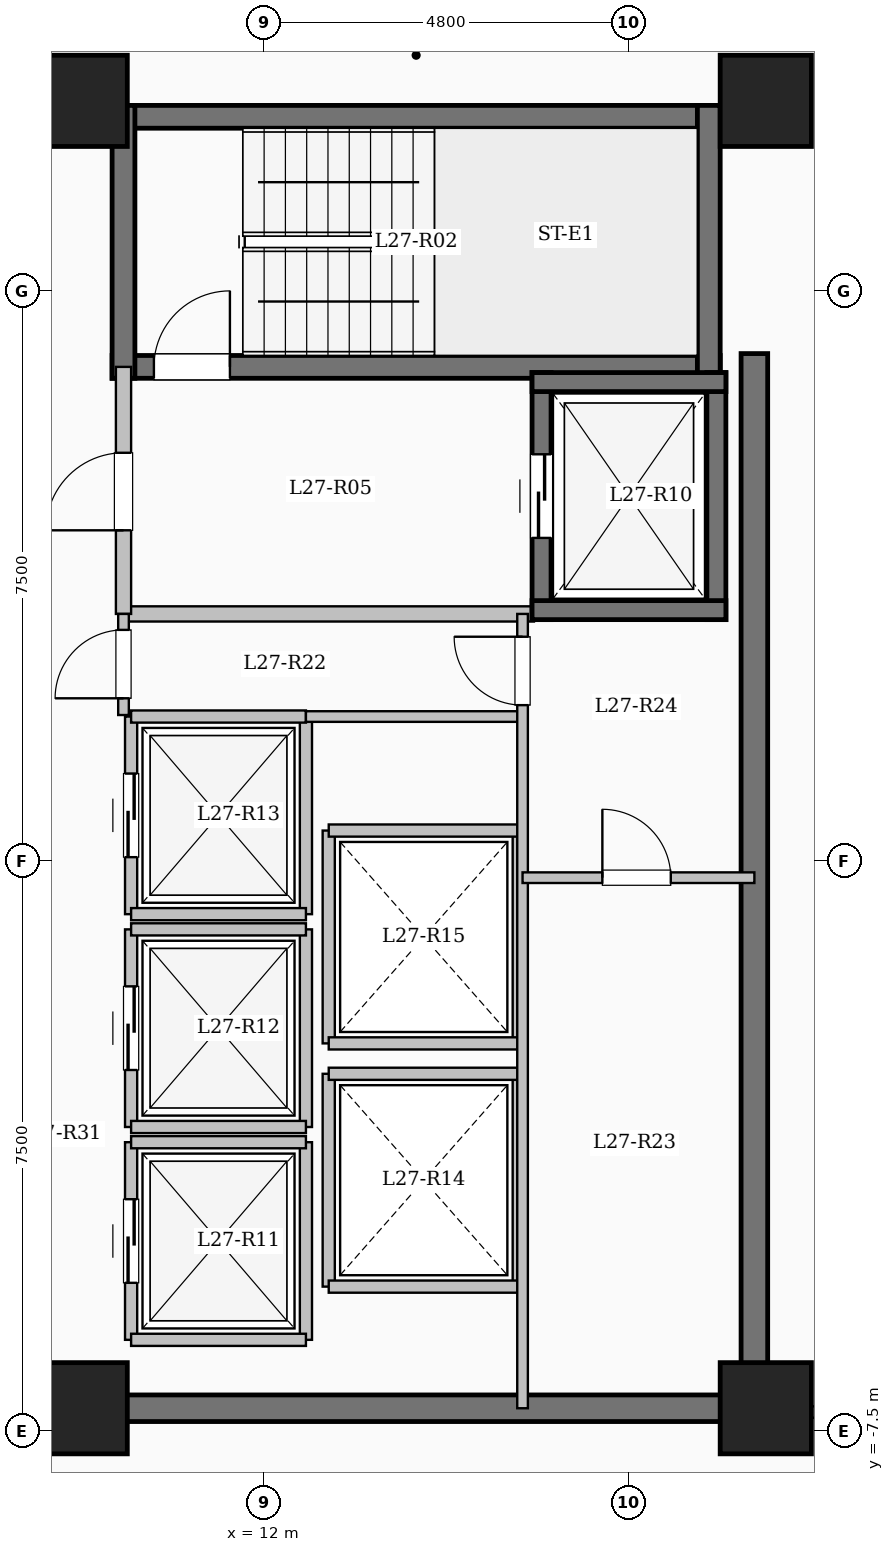
"""IFC4 building model, lengths in metres.
Left out: names, types, materials, properties, quantities, classifications, styles, units other than length and angle.
Written with IfcOpenShell. Run it as: python <this file> out.ifc"""

import sys

from ifc_helpers import new_model, si_unit, direction, frame, frame_2d, origin, origin_2d, place, context, subcontext, project, spatial, rectangle, extrude, element, fill, save


model = new_model("IFC4")
c1 = context("Model", 3, precision=1e-05, world=origin(), true_north=direction((0.0, 1.0)))
c2 = subcontext(c1, "Body", "Model", "MODEL_VIEW")
j1 = project(units=[si_unit("LENGTHUNIT", "METRE"), si_unit("PLANEANGLEUNIT", "RADIAN")], contexts=[c1])
p1 = place(None, origin())
s1 = spatial("IfcSite", under=j1, at=p1, CompositionType="ELEMENT")
p2 = place(p1, origin())
s2 = spatial("IfcBuilding", under=s1, at=p2, CompositionType="ELEMENT")
p3 = place(p2, frame((0.0, 0.0, 101.75)))
s3 = spatial("IfcBuildingStorey", under=s2, at=p3, CompositionType="ELEMENT", Elevation=101.75)
for number, where, z_axis, x_axis in (
    (1, (9.6, -7.2, 0.0), (0.0, 0.0, 1.0), (1.0, 0.0, 0.0)),
    (2, (9.6, 10.0, 0.0), (0.0, 0.0, 1.0), (1.0, 0.0, 0.0)),
    (3, (18.6, -7.2, 0.0), (0.0, 0.0, 1.0), (1.0, 0.0, 0.0)),
    (4, (18.6, 10.0, 0.0), (0.0, 0.0, 1.0), (1.0, 0.0, 0.0)),
):
    element("IfcColumn", number, at=place(p3, frame(where, z_axis=z_axis, x_axis=x_axis)), inside=s3, PredefinedType="COLUMN", context=c2, shape_type="SweptSolid", body=[
        extrude(rectangle(XDim=1.2, YDim=1.2, at=origin_2d()), origin(), (0.0, 0.0, 1.0), 3.35),
    ])
p4 = place(p3, frame((10.0, 9.79, 0.0), z_axis=(0.0, 0.0, 1.0), x_axis=(1.0, 0.0, 0.0)))
e5 = element("IfcWall", 5, at=p4, inside=s3, PredefinedType="SHEAR", context=c2, shape_type="SweptSolid", body=[
    extrude(rectangle(XDim=8.0, YDim=0.3, at=frame_2d((4.0, 0.0))), origin(), (0.0, 0.0, 1.0), 3.35),
])
p5 = place(p3, frame((10.0, 6.5, 0.0), z_axis=(0.0, 0.0, 1.0), x_axis=(1.0, 0.0, 0.0)))
e6 = element("IfcWall", 6, at=p5, inside=s3, PredefinedType="SHEAR", context=c2, shape_type="SweptSolid", body=[
    extrude(rectangle(XDim=8.0, YDim=0.3, at=frame_2d((4.0, 0.0))), origin(), (0.0, 0.0, 1.0), 3.35),
])
p6 = place(p5, frame((0.55, 0.0, 0.0)))
e7 = element("IfcOpeningElement", 7, at=p6, cuts=e6, PredefinedType="OPENING", context=c2, shape_type="SweptSolid", body=[
    extrude(rectangle(XDim=1.0, YDim=2.15, at=frame_2d((0.5, 1.075))), frame((0.0, 0.16, 0.0), z_axis=(0.0, -1.0, 0.0), x_axis=(1.0, 0.0, 0.0)), (0.0, 0.0, 1.0), 0.32),
])
for number, where, z_axis, x_axis in (
    (8, (10.15, 6.35, 0.0), (0.0, 0.0, 1.0), (0.0, 1.0, 0.0)),
    (9, (17.85, 6.35, 0.0), (0.0, 0.0, 1.0), (0.0, 1.0, 0.0)),
):
    element("IfcWall", number, at=place(p3, frame(where, z_axis=z_axis, x_axis=x_axis)), inside=s3, PredefinedType="SHEAR", context=c2, shape_type="SweptSolid", body=[
        extrude(rectangle(XDim=3.59, YDim=0.3, at=frame_2d((1.795, 0.0))), origin(), (0.0, 0.0, 1.0), 3.35),
    ])
p7 = place(p3, frame((10.15, 3.25, 0.0), z_axis=(0.0, 0.0, 1.0), x_axis=(1.0, 0.0, 0.0)))
e10 = element("IfcWall", 10, at=p7, inside=s3, PredefinedType="SOLIDWALL", context=c2, shape_type="SweptSolid", body=[
    extrude(rectangle(XDim=5.4, YDim=0.2, at=frame_2d((2.7, 0.0))), origin(), (0.0, 0.0, 1.0), 3.1),
])
p8 = place(p3, frame((10.15, 3.25, 0.0), z_axis=(0.0, 0.0, 1.0), x_axis=(0.0, 1.0, 0.0)))
e11 = element("IfcWall", 11, at=p8, inside=s3, PredefinedType="SOLIDWALL", context=c2, shape_type="SweptSolid", body=[
    extrude(rectangle(XDim=3.25, YDim=0.2, at=frame_2d((1.625, 0.0))), origin(), (0.0, 0.0, 1.0), 3.1),
])
p9 = place(p8, frame((1.1, 0.0, 0.0)))
e12 = element("IfcOpeningElement", 12, at=p9, cuts=e11, PredefinedType="OPENING", context=c2, shape_type="SweptSolid", body=[
    extrude(rectangle(XDim=1.02, YDim=2.15, at=frame_2d((0.51, 1.075))), frame((0.0, 0.11, 0.0), z_axis=(0.0, -1.0, 0.0), x_axis=(1.0, 0.0, 0.0)), (0.0, 0.0, 1.0), 0.22),
])
p10 = place(p3, frame((15.65, 3.175, 0.0), z_axis=(0.0, 0.0, 1.0), x_axis=(0.0, 1.0, 0.0)))
e13 = element("IfcWall", 13, at=p10, inside=s3, PredefinedType="SHEAR", context=c2, shape_type="SweptSolid", body=[
    extrude(rectangle(XDim=3.25, YDim=0.25, at=frame_2d((1.625, 0.0))), origin(), (0.0, 0.0, 1.0), 3.35),
])
p11 = place(p10, frame((1.075, 0.0, 0.0)))
e14 = element("IfcOpeningElement", 14, at=p11, cuts=e13, PredefinedType="OPENING", context=c2, shape_type="SweptSolid", body=[
    extrude(rectangle(XDim=1.1, YDim=2.15, at=frame_2d((0.55, 1.075))), frame((0.0, 0.135, 0.0), z_axis=(0.0, -1.0, 0.0), x_axis=(1.0, 0.0, 0.0)), (0.0, 0.0, 1.0), 0.27),
])
p12 = place(p3, frame((17.95, 3.175, 0.0), z_axis=(0.0, 0.0, 1.0), x_axis=(0.0, 1.0, 0.0)))
e15 = element("IfcWall", 15, at=p12, inside=s3, PredefinedType="SHEAR", context=c2, shape_type="SweptSolid", body=[
    extrude(rectangle(XDim=3.25, YDim=0.25, at=frame_2d((1.625, 0.0))), origin(), (0.0, 0.0, 1.0), 3.35),
])
for number, where, z_axis, x_axis in (
    (16, (15.525, 3.3, 0.0), (0.0, 0.0, 1.0), (1.0, 0.0, 0.0)),
    (17, (15.525, 6.3, 0.0), (0.0, 0.0, 1.0), (1.0, 0.0, 0.0)),
):
    element("IfcWall", number, at=place(p3, frame(where, z_axis=z_axis, x_axis=x_axis)), inside=s3, PredefinedType="SHEAR", context=c2, shape_type="SweptSolid", body=[
        extrude(rectangle(XDim=2.55, YDim=0.25, at=frame_2d((1.275, 0.0))), origin(), (0.0, 0.0, 1.0), 3.35),
    ])
p13 = place(p3, frame((10.25, -6.3, 0.0), z_axis=(0.0, 0.0, 1.0), x_axis=(0.0, 1.0, 0.0)))
e18 = element("IfcWall", 18, at=p13, inside=s3, PredefinedType="SOLIDWALL", context=c2, shape_type="SweptSolid", body=[
    extrude(rectangle(XDim=2.6, YDim=0.16, at=frame_2d((1.3, 0.0))), origin(), (0.0, 0.0, 1.0), 3.1),
])
p14 = place(p13, frame((0.75, 0.0, 0.0)))
e19 = element("IfcOpeningElement", 19, at=p14, cuts=e18, PredefinedType="OPENING", context=c2, shape_type="SweptSolid", body=[
    extrude(rectangle(XDim=1.1, YDim=2.15, at=frame_2d((0.55, 1.075))), frame((0.0, 0.09, 0.0), z_axis=(0.0, -1.0, 0.0), x_axis=(1.0, 0.0, 0.0)), (0.0, 0.0, 1.0), 0.18),
])
p15 = place(p3, frame((12.55, -6.3, 0.0), z_axis=(0.0, 0.0, 1.0), x_axis=(0.0, 1.0, 0.0)))
e20 = element("IfcWall", 20, at=p15, inside=s3, PredefinedType="SOLIDWALL", context=c2, shape_type="SweptSolid", body=[
    extrude(rectangle(XDim=2.6, YDim=0.16, at=frame_2d((1.3, 0.0))), origin(), (0.0, 0.0, 1.0), 3.1),
])
for number, where, z_axis, x_axis in (
    (21, (10.25, -6.3, 0.0), (0.0, 0.0, 1.0), (1.0, 0.0, 0.0)),
    (22, (10.25, -3.7, 0.0), (0.0, 0.0, 1.0), (1.0, 0.0, 0.0)),
):
    element("IfcWall", number, at=place(p3, frame(where, z_axis=z_axis, x_axis=x_axis)), inside=s3, PredefinedType="SOLIDWALL", context=c2, shape_type="SweptSolid", body=[
        extrude(rectangle(XDim=2.3, YDim=0.16, at=frame_2d((1.15, 0.0))), origin(), (0.0, 0.0, 1.0), 3.1),
    ])
p16 = place(p3, frame((10.25, -3.5, 0.0), z_axis=(0.0, 0.0, 1.0), x_axis=(0.0, 1.0, 0.0)))
e23 = element("IfcWall", 23, at=p16, inside=s3, PredefinedType="SOLIDWALL", context=c2, shape_type="SweptSolid", body=[
    extrude(rectangle(XDim=2.6, YDim=0.16, at=frame_2d((1.3, 0.0))), origin(), (0.0, 0.0, 1.0), 3.1),
])
p17 = place(p16, frame((0.75, 0.0, 0.0)))
e24 = element("IfcOpeningElement", 24, at=p17, cuts=e23, PredefinedType="OPENING", context=c2, shape_type="SweptSolid", body=[
    extrude(rectangle(XDim=1.1, YDim=2.15, at=frame_2d((0.55, 1.075))), frame((0.0, 0.09, 0.0), z_axis=(0.0, -1.0, 0.0), x_axis=(1.0, 0.0, 0.0)), (0.0, 0.0, 1.0), 0.18),
])
p18 = place(p3, frame((12.55, -3.5, 0.0), z_axis=(0.0, 0.0, 1.0), x_axis=(0.0, 1.0, 0.0)))
e25 = element("IfcWall", 25, at=p18, inside=s3, PredefinedType="SOLIDWALL", context=c2, shape_type="SweptSolid", body=[
    extrude(rectangle(XDim=2.6, YDim=0.16, at=frame_2d((1.3, 0.0))), origin(), (0.0, 0.0, 1.0), 3.1),
])
for number, where, z_axis, x_axis in (
    (26, (10.25, -3.5, 0.0), (0.0, 0.0, 1.0), (1.0, 0.0, 0.0)),
    (27, (10.25, -0.9, 0.0), (0.0, 0.0, 1.0), (1.0, 0.0, 0.0)),
):
    element("IfcWall", number, at=place(p3, frame(where, z_axis=z_axis, x_axis=x_axis)), inside=s3, PredefinedType="SOLIDWALL", context=c2, shape_type="SweptSolid", body=[
        extrude(rectangle(XDim=2.3, YDim=0.16, at=frame_2d((1.15, 0.0))), origin(), (0.0, 0.0, 1.0), 3.1),
    ])
p19 = place(p3, frame((10.25, -0.7, 0.0), z_axis=(0.0, 0.0, 1.0), x_axis=(0.0, 1.0, 0.0)))
e28 = element("IfcWall", 28, at=p19, inside=s3, PredefinedType="SOLIDWALL", context=c2, shape_type="SweptSolid", body=[
    extrude(rectangle(XDim=2.6, YDim=0.16, at=frame_2d((1.3, 0.0))), origin(), (0.0, 0.0, 1.0), 3.1),
])
p20 = place(p19, frame((0.75, 0.0, 0.0)))
e29 = element("IfcOpeningElement", 29, at=p20, cuts=e28, PredefinedType="OPENING", context=c2, shape_type="SweptSolid", body=[
    extrude(rectangle(XDim=1.1, YDim=2.15, at=frame_2d((0.55, 1.075))), frame((0.0, 0.09, 0.0), z_axis=(0.0, -1.0, 0.0), x_axis=(1.0, 0.0, 0.0)), (0.0, 0.0, 1.0), 0.18),
])
p21 = place(p3, frame((12.55, -0.7, 0.0), z_axis=(0.0, 0.0, 1.0), x_axis=(0.0, 1.0, 0.0)))
e30 = element("IfcWall", 30, at=p21, inside=s3, PredefinedType="SOLIDWALL", context=c2, shape_type="SweptSolid", body=[
    extrude(rectangle(XDim=2.6, YDim=0.16, at=frame_2d((1.3, 0.0))), origin(), (0.0, 0.0, 1.0), 3.1),
])
for number, where, z_axis, x_axis in (
    (31, (10.25, -0.7, 0.0), (0.0, 0.0, 1.0), (1.0, 0.0, 0.0)),
    (32, (10.25, 1.9, 0.0), (0.0, 0.0, 1.0), (1.0, 0.0, 0.0)),
):
    element("IfcWall", number, at=place(p3, frame(where, z_axis=z_axis, x_axis=x_axis)), inside=s3, PredefinedType="SOLIDWALL", context=c2, shape_type="SweptSolid", body=[
        extrude(rectangle(XDim=2.3, YDim=0.16, at=frame_2d((1.15, 0.0))), origin(), (0.0, 0.0, 1.0), 3.1),
    ])
for number, where, z_axis, x_axis in (
    (33, (12.85, -5.6, 0.0), (0.0, 0.0, 1.0), (0.0, 1.0, 0.0)),
    (34, (15.35, -5.6, 0.0), (0.0, 0.0, 1.0), (0.0, 1.0, 0.0)),
):
    element("IfcWall", number, at=place(p3, frame(where, z_axis=z_axis, x_axis=x_axis)), inside=s3, PredefinedType="SOLIDWALL", context=c2, shape_type="SweptSolid", body=[
        extrude(rectangle(XDim=2.8, YDim=0.16, at=frame_2d((1.4, 0.0))), origin(), (0.0, 0.0, 1.0), 3.1),
    ])
for number, where, z_axis, x_axis in (
    (35, (12.85, -5.6, 0.0), (0.0, 0.0, 1.0), (1.0, 0.0, 0.0)),
    (36, (12.85, -2.8, 0.0), (0.0, 0.0, 1.0), (1.0, 0.0, 0.0)),
):
    element("IfcWall", number, at=place(p3, frame(where, z_axis=z_axis, x_axis=x_axis)), inside=s3, PredefinedType="SOLIDWALL", context=c2, shape_type="SweptSolid", body=[
        extrude(rectangle(XDim=2.5, YDim=0.16, at=frame_2d((1.25, 0.0))), origin(), (0.0, 0.0, 1.0), 3.1),
    ])
for number, where, z_axis, x_axis in (
    (37, (12.85, -2.4, 0.0), (0.0, 0.0, 1.0), (0.0, 1.0, 0.0)),
    (38, (15.35, -2.4, 0.0), (0.0, 0.0, 1.0), (0.0, 1.0, 0.0)),
):
    element("IfcWall", number, at=place(p3, frame(where, z_axis=z_axis, x_axis=x_axis)), inside=s3, PredefinedType="SOLIDWALL", context=c2, shape_type="SweptSolid", body=[
        extrude(rectangle(XDim=2.8, YDim=0.16, at=frame_2d((1.4, 0.0))), origin(), (0.0, 0.0, 1.0), 3.1),
    ])
for number, where, z_axis, x_axis in (
    (39, (12.85, -2.4, 0.0), (0.0, 0.0, 1.0), (1.0, 0.0, 0.0)),
    (40, (12.85, 0.4, 0.0), (0.0, 0.0, 1.0), (1.0, 0.0, 0.0)),
):
    element("IfcWall", number, at=place(p3, frame(where, z_axis=z_axis, x_axis=x_axis)), inside=s3, PredefinedType="SOLIDWALL", context=c2, shape_type="SweptSolid", body=[
        extrude(rectangle(XDim=2.5, YDim=0.16, at=frame_2d((1.25, 0.0))), origin(), (0.0, 0.0, 1.0), 3.1),
    ])
p22 = place(p3, frame((18.45, -7.375, 0.0), z_axis=(0.0, 0.0, 1.0), x_axis=(0.0, 1.0, 0.0)))
e41 = element("IfcWall", 41, at=p22, inside=s3, PredefinedType="SHEAR", context=c2, shape_type="SweptSolid", body=[
    extrude(rectangle(XDim=14.05, YDim=0.35, at=frame_2d((7.025, 0.0))), origin(), (0.0, 0.0, 1.0), 3.35),
])
p23 = place(p3, frame((10.075, -7.2, 0.0), z_axis=(0.0, 0.0, 1.0), x_axis=(1.0, 0.0, 0.0)))
e42 = element("IfcWall", 42, at=p23, inside=s3, PredefinedType="SHEAR", context=c2, shape_type="SweptSolid", body=[
    extrude(rectangle(XDim=8.55, YDim=0.35, at=frame_2d((4.275, 0.0))), origin(), (0.0, 0.0, 1.0), 3.35),
])
p24 = place(p3, frame((12.55, 1.9, 0.0), z_axis=(0.0, 0.0, 1.0), x_axis=(1.0, 0.0, 0.0)))
e43 = element("IfcWall", 43, at=p24, inside=s3, PredefinedType="PARTITIONING", context=c2, shape_type="SweptSolid", body=[
    extrude(rectangle(XDim=2.85, YDim=0.14, at=frame_2d((1.425, 0.0))), origin(), (0.0, 0.0, 1.0), 3.1),
])
p25 = place(p3, frame((10.15, 1.92, 0.0), z_axis=(0.0, 0.0, 1.0), x_axis=(0.0, 1.0, 0.0)))
e44 = element("IfcWall", 44, at=p25, inside=s3, PredefinedType="PARTITIONING", context=c2, shape_type="SweptSolid", body=[
    extrude(rectangle(XDim=1.33, YDim=0.14, at=frame_2d((0.665, 0.0))), origin(), (0.0, 0.0, 1.0), 3.1),
])
p26 = place(p25, frame((0.22, 0.0, 0.0)))
e45 = element("IfcOpeningElement", 45, at=p26, cuts=e44, PredefinedType="OPENING", context=c2, shape_type="SweptSolid", body=[
    extrude(rectangle(XDim=0.9, YDim=2.08, at=frame_2d((0.45, 1.04))), frame((0.0, 0.08, 0.0), z_axis=(0.0, -1.0, 0.0), x_axis=(1.0, 0.0, 0.0)), (0.0, 0.0, 1.0), 0.16),
])
p27 = place(p3, frame((15.4, -7.2, 0.0), z_axis=(0.0, 0.0, 1.0), x_axis=(0.0, 1.0, 0.0)))
e46 = element("IfcWall", 46, at=p27, inside=s3, PredefinedType="PARTITIONING", context=c2, shape_type="SweptSolid", body=[
    extrude(rectangle(XDim=10.45, YDim=0.14, at=frame_2d((5.225, 0.0))), origin(), (0.0, 0.0, 1.0), 3.1),
])
p28 = place(p27, frame((9.25, 0.0, 0.0)))
e47 = element("IfcOpeningElement", 47, at=p28, cuts=e46, PredefinedType="OPENING", context=c2, shape_type="SweptSolid", body=[
    extrude(rectangle(XDim=0.9, YDim=2.08, at=frame_2d((0.45, 1.04))), frame((0.0, 0.08, 0.0), z_axis=(0.0, -1.0, 0.0), x_axis=(1.0, 0.0, 0.0)), (0.0, 0.0, 1.0), 0.16),
])
p29 = place(p3, frame((15.4, -0.22, 0.0), z_axis=(0.0, 0.0, 1.0), x_axis=(1.0, 0.0, 0.0)))
e48 = element("IfcWall", 48, at=p29, inside=s3, PredefinedType="PARTITIONING", context=c2, shape_type="SweptSolid", body=[
    extrude(rectangle(XDim=3.05, YDim=0.14, at=frame_2d((1.525, 0.0))), origin(), (0.0, 0.0, 1.0), 3.1),
])
p30 = place(p29, frame((1.05, 0.0, 0.0)))
e49 = element("IfcOpeningElement", 49, at=p30, cuts=e48, PredefinedType="OPENING", context=c2, shape_type="SweptSolid", body=[
    extrude(rectangle(XDim=0.9, YDim=2.08, at=frame_2d((0.45, 1.04))), frame((0.0, 0.08, 0.0), z_axis=(0.0, -1.0, 0.0), x_axis=(1.0, 0.0, 0.0)), (0.0, 0.0, 1.0), 0.16),
])
p31 = place(p3, frame((18.45, -7.25, 0.0), z_axis=(0.0, 0.0, 1.0), x_axis=(1.0, 0.0, 0.0)))
e50 = element("IfcWall", 50, at=p31, inside=s3, PredefinedType="PARTITIONING", context=c2, shape_type="SweptSolid", body=[
    extrude(rectangle(XDim=8.43, YDim=0.15, at=frame_2d((4.215, 0.0))), origin(), (0.0, 0.0, 1.0), 3.1),
])
p32 = place(p31, frame((1.95, 0.0, 0.0)))
e51 = element("IfcOpeningElement", 51, at=p32, cuts=e50, PredefinedType="OPENING", context=c2, shape_type="SweptSolid", body=[
    extrude(rectangle(XDim=1.08, YDim=2.15, at=frame_2d((0.54, 1.075))), frame((0.0, 0.085, 0.0), z_axis=(0.0, -1.0, 0.0), x_axis=(1.0, 0.0, 0.0)), (0.0, 0.0, 1.0), 0.17),
])
p33 = place(p6, origin())
e52 = element("IfcDoor", 52, at=p33, inside=s3, OperationType="SINGLE_SWING_RIGHT", PredefinedType="DOOR", context=c2, shape_type="SweptSolid", body=[
    extrude(rectangle(XDim=1.0, YDim=2.15, at=frame_2d((0.5, 1.075))), frame((0.0, 0.025, 0.0), z_axis=(0.0, -1.0, 0.0), x_axis=(1.0, 0.0, 0.0)), (0.0, 0.0, 1.0), 0.05),
])
fill(e7, e52)
p34 = place(p9, origin())
e53 = element("IfcDoor", 53, at=p34, inside=s3, OperationType="SINGLE_SWING_LEFT", PredefinedType="DOOR", context=c2, shape_type="SweptSolid", body=[
    extrude(rectangle(XDim=1.02, YDim=2.15, at=frame_2d((0.51, 1.075))), frame((0.0, 0.025, 0.0), z_axis=(0.0, -1.0, 0.0), x_axis=(1.0, 0.0, 0.0)), (0.0, 0.0, 1.0), 0.05),
])
fill(e12, e53)
p35 = place(p11, origin())
e54 = element("IfcDoor", 54, at=p35, inside=s3, OperationType="SLIDING_TO_LEFT", PredefinedType="DOOR", context=c2, shape_type="SweptSolid", body=[
    extrude(rectangle(XDim=1.1, YDim=2.15, at=frame_2d((0.55, 1.075))), frame((0.0, 0.025, 0.0), z_axis=(0.0, -1.0, 0.0), x_axis=(1.0, 0.0, 0.0)), (0.0, 0.0, 1.0), 0.05),
])
fill(e14, e54)
p36 = place(p14, origin())
e55 = element("IfcDoor", 55, at=p36, inside=s3, OperationType="SLIDING_TO_LEFT", PredefinedType="DOOR", context=c2, shape_type="SweptSolid", body=[
    extrude(rectangle(XDim=1.1, YDim=2.15, at=frame_2d((0.55, 1.075))), frame((0.0, 0.025, 0.0), z_axis=(0.0, -1.0, 0.0), x_axis=(1.0, 0.0, 0.0)), (0.0, 0.0, 1.0), 0.05),
])
fill(e19, e55)
p37 = place(p17, origin())
e56 = element("IfcDoor", 56, at=p37, inside=s3, OperationType="SLIDING_TO_LEFT", PredefinedType="DOOR", context=c2, shape_type="SweptSolid", body=[
    extrude(rectangle(XDim=1.1, YDim=2.15, at=frame_2d((0.55, 1.075))), frame((0.0, 0.025, 0.0), z_axis=(0.0, -1.0, 0.0), x_axis=(1.0, 0.0, 0.0)), (0.0, 0.0, 1.0), 0.05),
])
fill(e24, e56)
p38 = place(p20, origin())
e57 = element("IfcDoor", 57, at=p38, inside=s3, OperationType="SLIDING_TO_LEFT", PredefinedType="DOOR", context=c2, shape_type="SweptSolid", body=[
    extrude(rectangle(XDim=1.1, YDim=2.15, at=frame_2d((0.55, 1.075))), frame((0.0, 0.025, 0.0), z_axis=(0.0, -1.0, 0.0), x_axis=(1.0, 0.0, 0.0)), (0.0, 0.0, 1.0), 0.05),
])
fill(e29, e57)
p39 = place(p26, origin())
e58 = element("IfcDoor", 58, at=p39, inside=s3, OperationType="SINGLE_SWING_LEFT", PredefinedType="DOOR", context=c2, shape_type="SweptSolid", body=[
    extrude(rectangle(XDim=0.9, YDim=2.08, at=frame_2d((0.45, 1.04))), frame((0.0, 0.025, 0.0), z_axis=(0.0, -1.0, 0.0), x_axis=(1.0, 0.0, 0.0)), (0.0, 0.0, 1.0), 0.05),
])
fill(e45, e58)
p40 = place(p28, origin())
e59 = element("IfcDoor", 59, at=p40, inside=s3, OperationType="SINGLE_SWING_RIGHT", PredefinedType="DOOR", context=c2, shape_type="SweptSolid", body=[
    extrude(rectangle(XDim=0.9, YDim=2.08, at=frame_2d((0.45, 1.04))), frame((0.0, 0.025, 0.0), z_axis=(0.0, -1.0, 0.0), x_axis=(1.0, 0.0, 0.0)), (0.0, 0.0, 1.0), 0.05),
])
fill(e47, e59)
p41 = place(p30, origin())
e60 = element("IfcDoor", 60, at=p41, inside=s3, OperationType="SINGLE_SWING_LEFT", PredefinedType="DOOR", context=c2, shape_type="SweptSolid", body=[
    extrude(rectangle(XDim=0.9, YDim=2.08, at=frame_2d((0.45, 1.04))), frame((0.0, 0.025, 0.0), z_axis=(0.0, -1.0, 0.0), x_axis=(1.0, 0.0, 0.0)), (0.0, 0.0, 1.0), 0.05),
])
fill(e49, e60)
save(model, sys.argv[1])
